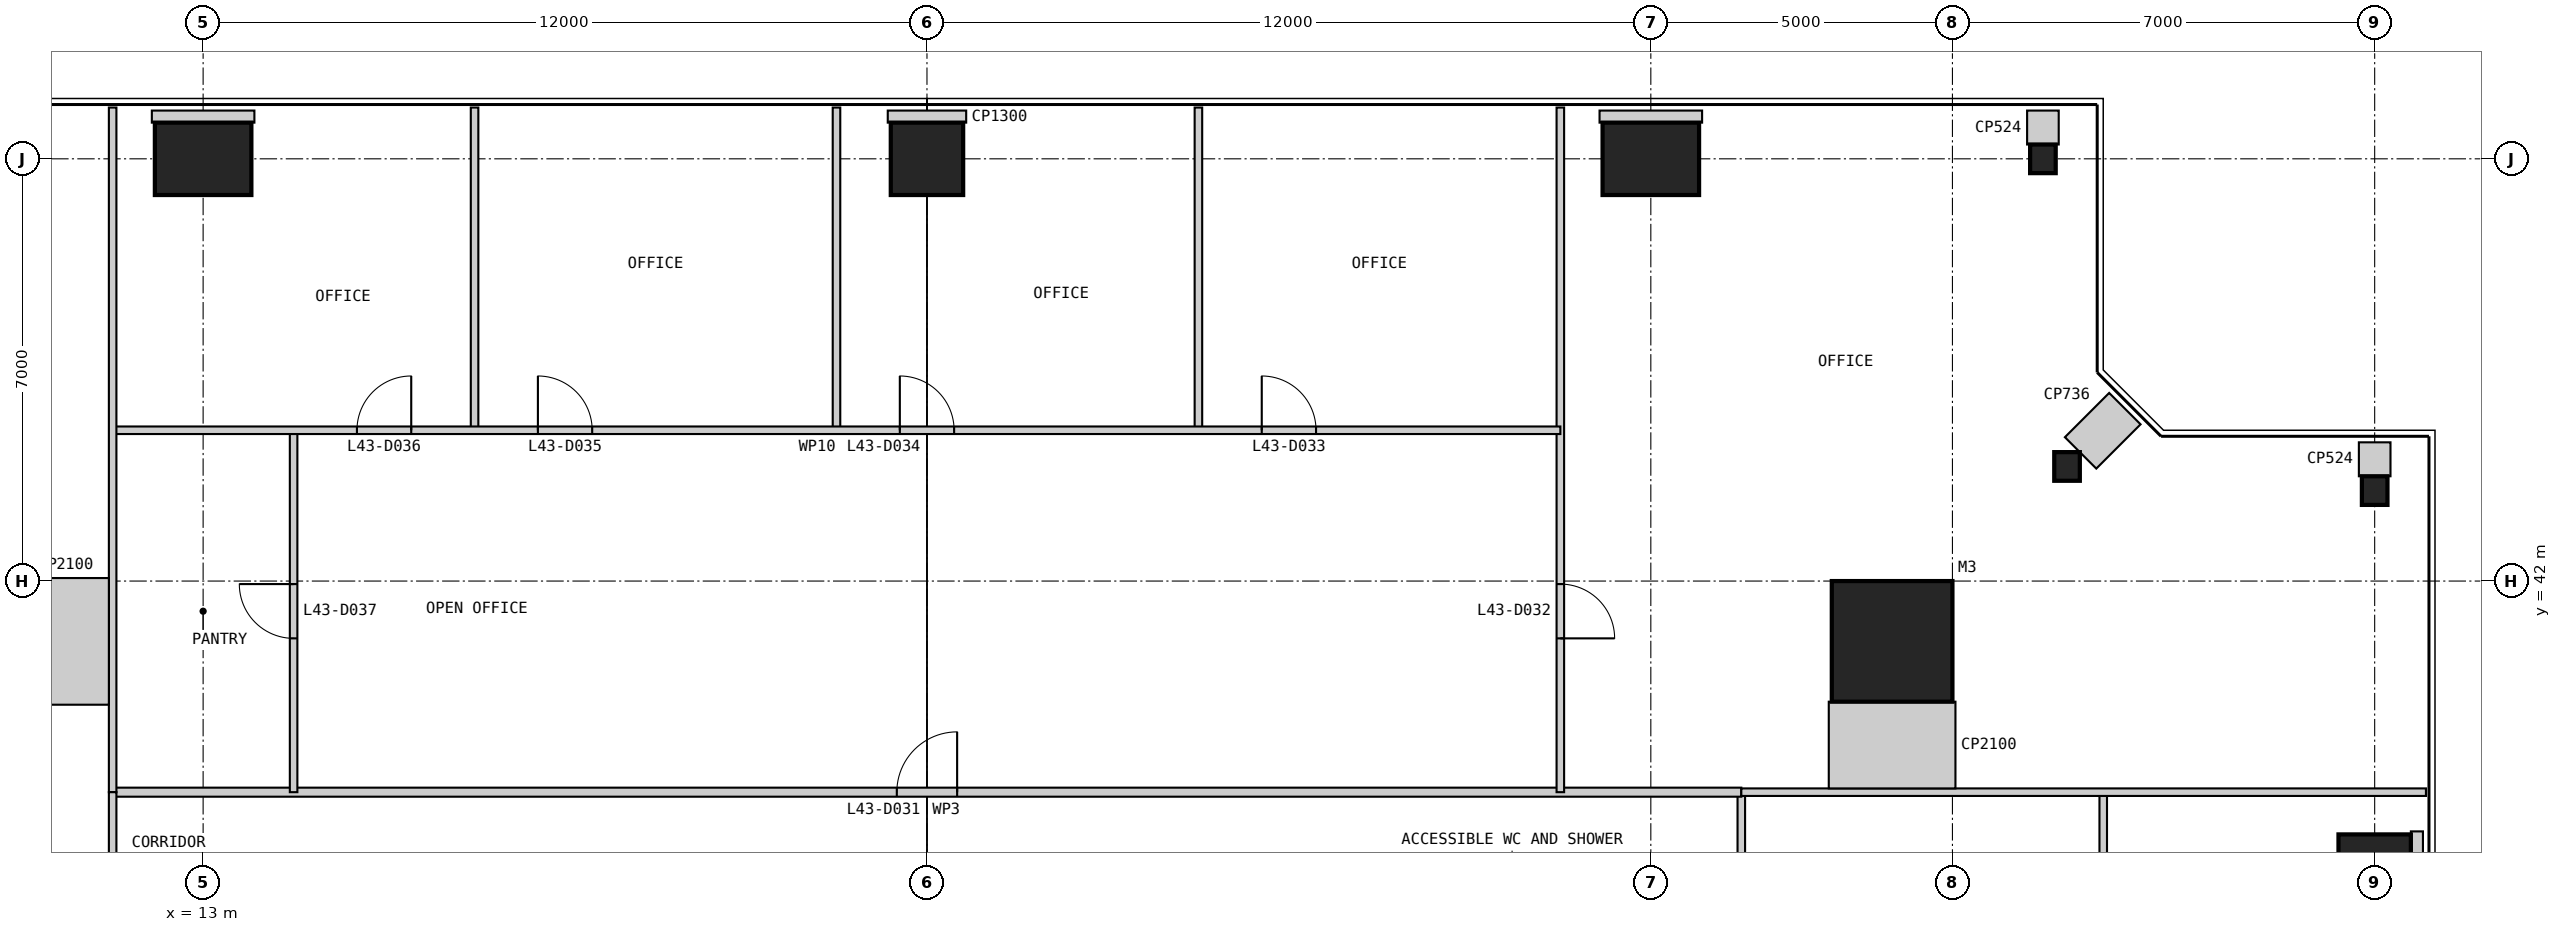
"""IFC4 building model, lengths in metres.
Left out: names, types, materials, properties, quantities, classifications, styles, units other than length and angle.
Written with IfcOpenShell. Run it as: python <this file> out.ifc"""

import sys

from ifc_helpers import new_model, si_unit, direction, frame, frame_2d, origin, origin_2d, place, context, subcontext, project, spatial, rectangle, i_section, extrude, element, fill, save


model = new_model("IFC4")
c1 = context("Model", 3, precision=1e-05, world=origin(), true_north=direction((0.0, 1.0)))
c2 = subcontext(c1, "Body", "Model", "MODEL_VIEW")
j1 = project(units=[si_unit("LENGTHUNIT", "METRE"), si_unit("PLANEANGLEUNIT", "RADIAN")], contexts=[c1])
p1 = place(None, origin())
s1 = spatial("IfcSite", under=j1, at=p1, CompositionType="ELEMENT")
p2 = place(p1, origin())
s2 = spatial("IfcBuilding", under=s1, at=p2, CompositionType="ELEMENT")
p3 = place(p2, frame((0.0, 0.0, 185.8)))
s3 = spatial("IfcBuildingStorey", under=s2, at=p3, CompositionType="ELEMENT", Elevation=185.8)
p4 = place(p3, frame((41.0, 41.0, 0.0), z_axis=(0.0, 0.0, 1.0), x_axis=(1.0, 0.0, 0.0)))
e1 = element("IfcColumn", 1, at=p4, inside=s3, PredefinedType="COLUMN", context=c2, shape_type="SweptSolid", body=[
    extrude(rectangle(XDim=2.0, YDim=2.0, at=origin_2d()), origin(), (0.0, 0.0, 1.0), 4.0),
])
p5 = place(p3, frame((49.0, 37.0, 0.0), z_axis=(0.0, 0.0, 1.0), x_axis=(1.0, 0.0, 0.0)))
e2 = element("IfcColumn", 2, at=p5, inside=s3, PredefinedType="COLUMN", context=c2, shape_type="SweptSolid", body=[
    extrude(rectangle(XDim=1.2, YDim=1.6, at=origin_2d()), origin(), (0.0, 0.0, 1.0), 4.0),
])
for number, where, z_axis, x_axis in (
    (3, (49.0, 43.5, 0.0), (0.0, 0.0, 1.0), (1.0, 0.0, 0.0)),
    (4, (43.9, 43.9, 0.0), (0.0, 0.0, 1.0), (1.0, 0.0, 0.0)),
    (5, (43.5, 49.0, 0.0), (0.0, 0.0, 1.0), (1.0, 0.0, 0.0)),
):
    element("IfcColumn", number, at=place(p3, frame(where, z_axis=z_axis, x_axis=x_axis)), inside=s3, PredefinedType="COLUMN", context=c2, shape_type="SweptSolid", body=[
        extrude(i_section(OverallWidth=0.424, OverallDepth=0.475, WebThickness=0.048, FlangeThickness=0.077, at=origin_2d()), origin(), (0.0, 0.0, 1.0), 4.0),
    ])
p6 = place(p3, frame((37.0, 49.0, 0.0), z_axis=(0.0, 0.0, 1.0), x_axis=(1.0, 0.0, 0.0)))
e6 = element("IfcColumn", 6, at=p6, inside=s3, PredefinedType="COLUMN", context=c2, shape_type="SweptSolid", body=[
    extrude(rectangle(XDim=1.6, YDim=1.2, at=origin_2d()), origin(), (0.0, 0.0, 1.0), 4.0),
])
p7 = place(p3, frame((25.0, 49.0, 0.0), z_axis=(0.0, 0.0, 1.0), x_axis=(1.0, 0.0, 0.0)))
e7 = element("IfcColumn", 7, at=p7, inside=s3, PredefinedType="COLUMN", context=c2, shape_type="SweptSolid", body=[
    extrude(rectangle(XDim=1.2, YDim=1.2, at=origin_2d()), origin(), (0.0, 0.0, 1.0), 4.0),
])
p8 = place(p3, frame((13.0, 49.0, 0.0), z_axis=(0.0, 0.0, 1.0), x_axis=(1.0, 0.0, 0.0)))
e8 = element("IfcColumn", 8, at=p8, inside=s3, PredefinedType="COLUMN", context=c2, shape_type="SweptSolid", body=[
    extrude(rectangle(XDim=1.6, YDim=1.2, at=origin_2d()), origin(), (0.0, 0.0, 1.0), 4.0),
])
p9 = place(p3, frame((44.5, 32.5, 0.0), z_axis=(0.0, 0.0, 1.0), x_axis=(0.0, 1.0, 0.0)))
e9 = element("IfcWall", 9, at=p9, inside=s3, PredefinedType="PARTITIONING", context=c2, shape_type="SweptSolid", body=[
    extrude(rectangle(XDim=6.0, YDim=0.125, at=frame_2d((3.0, 0.0))), origin(), (0.0, 0.0, 1.0), 3.85),
])
p10 = place(p3, frame((38.5, 35.5, 0.0), z_axis=(0.0, 0.0, 1.0), x_axis=(0.0, 1.0, 0.0)))
e10 = element("IfcWall", 10, at=p10, inside=s3, PredefinedType="PARTITIONING", context=c2, shape_type="SweptSolid", body=[
    extrude(rectangle(XDim=3.0, YDim=0.125, at=frame_2d((1.5, 0.0))), origin(), (0.0, 0.0, 1.0), 3.85),
])
p11 = place(p3, frame((38.5, 38.5, 0.0), z_axis=(0.0, 0.0, 1.0), x_axis=(-1.0, 0.0, 0.0)))
e11 = element("IfcWall", 11, at=p11, inside=s3, PredefinedType="PARTITIONING", context=c2, shape_type="SweptSolid", body=[
    extrude(rectangle(XDim=27.0, YDim=0.15, at=frame_2d((13.5, 0.0))), origin(), (0.0, 0.0, 1.0), 3.85),
])
p12 = place(p11, frame((13.0, 0.0, 0.0)))
e12 = element("IfcOpeningElement", 12, at=p12, cuts=e11, PredefinedType="OPENING", context=c2, shape_type="SweptSolid", body=[
    extrude(rectangle(XDim=1.0, YDim=2.2, at=frame_2d((0.5, 1.1))), frame((0.0, 0.085, 0.0), z_axis=(0.0, -1.0, 0.0), x_axis=(1.0, 0.0, 0.0)), (0.0, 0.0, 1.0), 0.17),
])
p13 = place(p3, frame((49.85, 38.5, 0.0), z_axis=(0.0, 0.0, 1.0), x_axis=(-1.0, 0.0, 0.0)))
e13 = element("IfcWall", 13, at=p13, inside=s3, PredefinedType="PARTITIONING", context=c2, shape_type="SweptSolid", body=[
    extrude(rectangle(XDim=11.35, YDim=0.125, at=frame_2d((5.675, 0.0))), origin(), (0.0, 0.0, 1.0), 3.85),
])
p14 = place(p3, frame((35.5, 49.85, 0.0), z_axis=(0.0, 0.0, 1.0), x_axis=(0.0, -1.0, 0.0)))
e14 = element("IfcWall", 14, at=p14, inside=s3, PredefinedType="PARTITIONING", context=c2, shape_type="SweptSolid", body=[
    extrude(rectangle(XDim=11.35, YDim=0.125, at=frame_2d((5.675, 0.0))), origin(), (0.0, 0.0, 1.0), 3.85),
])
p15 = place(p14, frame((7.9, 0.0, 0.0)))
e15 = element("IfcOpeningElement", 15, at=p15, cuts=e14, PredefinedType="OPENING", context=c2, shape_type="SweptSolid", body=[
    extrude(rectangle(XDim=0.9, YDim=2.2, at=frame_2d((0.45, 1.1))), frame((0.0, 0.073, 0.0), z_axis=(0.0, -1.0, 0.0), x_axis=(1.0, 0.0, 0.0)), (0.0, 0.0, 1.0), 0.145),
])
for number, where, z_axis, x_axis in (
    (16, (29.5, 49.85, 0.0), (0.0, 0.0, 1.0), (0.0, -1.0, 0.0)),
    (17, (23.5, 49.85, 0.0), (0.0, 0.0, 1.0), (0.0, -1.0, 0.0)),
    (18, (17.5, 49.85, 0.0), (0.0, 0.0, 1.0), (0.0, -1.0, 0.0)),
):
    element("IfcWall", number, at=place(p3, frame(where, z_axis=z_axis, x_axis=x_axis)), inside=s3, PredefinedType="PARTITIONING", context=c2, shape_type="SweptSolid", body=[
        extrude(rectangle(XDim=5.35, YDim=0.125, at=frame_2d((2.675, 0.0))), origin(), (0.0, 0.0, 1.0), 3.85),
    ])
p16 = place(p3, frame((14.5, 44.5, 0.0), z_axis=(0.0, 0.0, 1.0), x_axis=(0.0, -1.0, 0.0)))
e19 = element("IfcWall", 19, at=p16, inside=s3, PredefinedType="PARTITIONING", context=c2, shape_type="SweptSolid", body=[
    extrude(rectangle(XDim=6.0, YDim=0.125, at=frame_2d((3.0, 0.0))), origin(), (0.0, 0.0, 1.0), 3.85),
])
p17 = place(p16, frame((2.55, 0.0, 0.0)))
e20 = element("IfcOpeningElement", 20, at=p17, cuts=e19, PredefinedType="OPENING", context=c2, shape_type="SweptSolid", body=[
    extrude(rectangle(XDim=0.9, YDim=2.2, at=frame_2d((0.45, 1.1))), frame((0.0, 0.073, 0.0), z_axis=(0.0, -1.0, 0.0), x_axis=(1.0, 0.0, 0.0)), (0.0, 0.0, 1.0), 0.145),
])
p18 = place(p3, frame((35.5, 44.5, 0.0), z_axis=(0.0, 0.0, 1.0), x_axis=(-1.0, 0.0, 0.0)))
e21 = element("IfcWall", 21, at=p18, inside=s3, PredefinedType="PARTITIONING", context=c2, shape_type="SweptSolid", body=[
    extrude(rectangle(XDim=24.0, YDim=0.125, at=frame_2d((12.0, 0.0))), origin(), (0.0, 0.0, 1.0), 3.85),
])
p19 = place(p18, frame((4.05, 0.0, 0.0)))
e22 = element("IfcOpeningElement", 22, at=p19, cuts=e21, PredefinedType="OPENING", context=c2, shape_type="SweptSolid", body=[
    extrude(rectangle(XDim=0.9, YDim=2.2, at=frame_2d((0.45, 1.1))), frame((0.0, 0.073, 0.0), z_axis=(0.0, -1.0, 0.0), x_axis=(1.0, 0.0, 0.0)), (0.0, 0.0, 1.0), 0.145),
])
p20 = place(p18, frame((10.05, 0.0, 0.0)))
e23 = element("IfcOpeningElement", 23, at=p20, cuts=e21, PredefinedType="OPENING", context=c2, shape_type="SweptSolid", body=[
    extrude(rectangle(XDim=0.9, YDim=2.2, at=frame_2d((0.45, 1.1))), frame((0.0, 0.073, 0.0), z_axis=(0.0, -1.0, 0.0), x_axis=(1.0, 0.0, 0.0)), (0.0, 0.0, 1.0), 0.145),
])
p21 = place(p18, frame((16.05, 0.0, 0.0)))
e24 = element("IfcOpeningElement", 24, at=p21, cuts=e21, PredefinedType="OPENING", context=c2, shape_type="SweptSolid", body=[
    extrude(rectangle(XDim=0.9, YDim=2.2, at=frame_2d((0.45, 1.1))), frame((0.0, 0.073, 0.0), z_axis=(0.0, -1.0, 0.0), x_axis=(1.0, 0.0, 0.0)), (0.0, 0.0, 1.0), 0.145),
])
p22 = place(p18, frame((19.05, 0.0, 0.0)))
e25 = element("IfcOpeningElement", 25, at=p22, cuts=e21, PredefinedType="OPENING", context=c2, shape_type="SweptSolid", body=[
    extrude(rectangle(XDim=0.9, YDim=2.2, at=frame_2d((0.45, 1.1))), frame((0.0, 0.073, 0.0), z_axis=(0.0, -1.0, 0.0), x_axis=(1.0, 0.0, 0.0)), (0.0, 0.0, 1.0), 0.145),
])
p23 = place(p3, frame((11.5, 49.85, 0.0), z_axis=(0.0, 0.0, 1.0), x_axis=(0.0, -1.0, 0.0)))
e26 = element("IfcWall", 26, at=p23, inside=s3, PredefinedType="PARTITIONING", context=c2, shape_type="SweptSolid", body=[
    extrude(rectangle(XDim=11.35, YDim=0.125, at=frame_2d((5.675, 0.0))), origin(), (0.0, 0.0, 1.0), 3.85),
])
p24 = place(p3, frame((11.5, 38.5, 0.0), z_axis=(0.0, 0.0, 1.0), x_axis=(0.0, -1.0, 0.0)))
e27 = element("IfcWall", 27, at=p24, inside=s3, PredefinedType="PARTITIONING", context=c2, shape_type="SweptSolid", body=[
    extrude(rectangle(XDim=3.0, YDim=0.125, at=frame_2d((1.5, 0.0))), origin(), (0.0, 0.0, 1.0), 3.85),
])
p25 = place(p3, frame((49.8, 37.0, 0.0), z_axis=(0.0, 0.0, 1.0), x_axis=(-1.0, 0.0, 0.0)))
e28 = element("IfcWall", 28, at=p25, inside=s3, PredefinedType="PARTITIONING", context=c2, shape_type="SweptSolid", body=[
    extrude(rectangle(XDim=0.2, YDim=1.7, at=frame_2d((0.1, 0.0))), origin(), (0.0, 0.0, 1.0), 3.85),
])
p26 = place(p3, frame((41.0, 38.562, 0.0), z_axis=(0.0, 0.0, 1.0), x_axis=(0.0, 1.0, 0.0)))
e29 = element("IfcWall", 29, at=p26, inside=s3, PredefinedType="PARTITIONING", context=c2, shape_type="SweptSolid", body=[
    extrude(rectangle(XDim=1.438, YDim=2.1, at=frame_2d((0.719, 0.0))), origin(), (0.0, 0.0, 1.0), 3.85),
])
p27 = place(p3, frame((49.0, 44.3, 0.0), z_axis=(0.0, 0.0, 1.0), x_axis=(0.0, -1.0, 0.0)))
e30 = element("IfcWall", 30, at=p27, inside=s3, PredefinedType="PARTITIONING", context=c2, shape_type="SweptSolid", body=[
    extrude(rectangle(XDim=0.562, YDim=0.524, at=frame_2d((0.281, 0.0))), origin(), (0.0, 0.0, 1.0), 3.85),
])
p28 = place(p3, frame((44.859, 44.859, 0.0), z_axis=(0.0, 0.0, 1.0), x_axis=(-0.707106781187, -0.707106781187, 0.0)))
e31 = element("IfcWall", 31, at=p28, inside=s3, PredefinedType="PARTITIONING", context=c2, shape_type="SweptSolid", body=[
    extrude(rectangle(XDim=1.038, YDim=0.736, at=frame_2d((0.519, 0.0))), origin(), (0.0, 0.0, 1.0), 3.85),
])
p29 = place(p3, frame((43.5, 49.8, 0.0), z_axis=(0.0, 0.0, 1.0), x_axis=(0.0, -1.0, 0.0)))
e32 = element("IfcWall", 32, at=p29, inside=s3, PredefinedType="PARTITIONING", context=c2, shape_type="SweptSolid", body=[
    extrude(rectangle(XDim=0.562, YDim=0.524, at=frame_2d((0.281, 0.0))), origin(), (0.0, 0.0, 1.0), 3.85),
])
p30 = place(p3, frame((37.0, 49.8, 0.0), z_axis=(0.0, 0.0, 1.0), x_axis=(0.0, -1.0, 0.0)))
e33 = element("IfcWall", 33, at=p30, inside=s3, PredefinedType="PARTITIONING", context=c2, shape_type="SweptSolid", body=[
    extrude(rectangle(XDim=0.2, YDim=1.7, at=frame_2d((0.1, 0.0))), origin(), (0.0, 0.0, 1.0), 3.85),
])
p31 = place(p3, frame((25.0, 49.8, 0.0), z_axis=(0.0, 0.0, 1.0), x_axis=(0.0, -1.0, 0.0)))
e34 = element("IfcWall", 34, at=p31, inside=s3, PredefinedType="PARTITIONING", context=c2, shape_type="SweptSolid", body=[
    extrude(rectangle(XDim=0.2, YDim=1.3, at=frame_2d((0.1, 0.0))), origin(), (0.0, 0.0, 1.0), 3.85),
])
p32 = place(p3, frame((13.0, 49.8, 0.0), z_axis=(0.0, 0.0, 1.0), x_axis=(0.0, -1.0, 0.0)))
e35 = element("IfcWall", 35, at=p32, inside=s3, PredefinedType="PARTITIONING", context=c2, shape_type="SweptSolid", body=[
    extrude(rectangle(XDim=0.2, YDim=1.7, at=frame_2d((0.1, 0.0))), origin(), (0.0, 0.0, 1.0), 3.85),
])
p33 = place(p3, frame((11.438, 41.0, 0.0), z_axis=(0.0, 0.0, 1.0), x_axis=(-1.0, 0.0, 0.0)))
e36 = element("IfcWall", 36, at=p33, inside=s3, PredefinedType="PARTITIONING", context=c2, shape_type="SweptSolid", body=[
    extrude(rectangle(XDim=1.438, YDim=2.1, at=frame_2d((0.719, 0.0))), origin(), (0.0, 0.0, 1.0), 3.85),
])
p34 = place(p12, frame((1.0, 0.0, 0.0), z_axis=(0.0, 0.0, 1.0), x_axis=(-1.0, 0.0, 0.0)))
e37 = element("IfcDoor", 37, at=p34, inside=s3, OperationType="SINGLE_SWING_RIGHT", PredefinedType="DOOR", context=c2, shape_type="SweptSolid", body=[
    extrude(rectangle(XDim=1.0, YDim=2.2, at=frame_2d((0.5, 1.1))), frame((0.0, 0.025, 0.0), z_axis=(0.0, -1.0, 0.0), x_axis=(1.0, 0.0, 0.0)), (0.0, 0.0, 1.0), 0.05),
])
fill(e12, e37)
p35 = place(p15, origin())
e38 = element("IfcDoor", 38, at=p35, inside=s3, OperationType="SINGLE_SWING_RIGHT", PredefinedType="DOOR", context=c2, shape_type="SweptSolid", body=[
    extrude(rectangle(XDim=0.9, YDim=2.2, at=frame_2d((0.45, 1.1))), frame((0.0, 0.025, 0.0), z_axis=(0.0, -1.0, 0.0), x_axis=(1.0, 0.0, 0.0)), (0.0, 0.0, 1.0), 0.05),
])
fill(e15, e38)
p36 = place(p19, frame((0.9, 0.0, 0.0), z_axis=(0.0, 0.0, 1.0), x_axis=(-1.0, 0.0, 0.0)))
e39 = element("IfcDoor", 39, at=p36, inside=s3, OperationType="SINGLE_SWING_LEFT", PredefinedType="DOOR", context=c2, shape_type="SweptSolid", body=[
    extrude(rectangle(XDim=0.9, YDim=2.2, at=frame_2d((0.45, 1.1))), frame((0.0, 0.025, 0.0), z_axis=(0.0, -1.0, 0.0), x_axis=(1.0, 0.0, 0.0)), (0.0, 0.0, 1.0), 0.05),
])
fill(e22, e39)
p37 = place(p20, frame((0.9, 0.0, 0.0), z_axis=(0.0, 0.0, 1.0), x_axis=(-1.0, 0.0, 0.0)))
e40 = element("IfcDoor", 40, at=p37, inside=s3, OperationType="SINGLE_SWING_LEFT", PredefinedType="DOOR", context=c2, shape_type="SweptSolid", body=[
    extrude(rectangle(XDim=0.9, YDim=2.2, at=frame_2d((0.45, 1.1))), frame((0.0, 0.025, 0.0), z_axis=(0.0, -1.0, 0.0), x_axis=(1.0, 0.0, 0.0)), (0.0, 0.0, 1.0), 0.05),
])
fill(e23, e40)
p38 = place(p21, frame((0.9, 0.0, 0.0), z_axis=(0.0, 0.0, 1.0), x_axis=(-1.0, 0.0, 0.0)))
e41 = element("IfcDoor", 41, at=p38, inside=s3, OperationType="SINGLE_SWING_LEFT", PredefinedType="DOOR", context=c2, shape_type="SweptSolid", body=[
    extrude(rectangle(XDim=0.9, YDim=2.2, at=frame_2d((0.45, 1.1))), frame((0.0, 0.025, 0.0), z_axis=(0.0, -1.0, 0.0), x_axis=(1.0, 0.0, 0.0)), (0.0, 0.0, 1.0), 0.05),
])
fill(e24, e41)
p39 = place(p22, frame((0.9, 0.0, 0.0), z_axis=(0.0, 0.0, 1.0), x_axis=(-1.0, 0.0, 0.0)))
e42 = element("IfcDoor", 42, at=p39, inside=s3, OperationType="SINGLE_SWING_RIGHT", PredefinedType="DOOR", context=c2, shape_type="SweptSolid", body=[
    extrude(rectangle(XDim=0.9, YDim=2.2, at=frame_2d((0.45, 1.1))), frame((0.0, 0.025, 0.0), z_axis=(0.0, -1.0, 0.0), x_axis=(1.0, 0.0, 0.0)), (0.0, 0.0, 1.0), 0.05),
])
fill(e25, e42)
p40 = place(p17, frame((0.9, 0.0, 0.0), z_axis=(0.0, 0.0, 1.0), x_axis=(-1.0, 0.0, 0.0)))
e43 = element("IfcDoor", 43, at=p40, inside=s3, OperationType="SINGLE_SWING_RIGHT", PredefinedType="DOOR", context=c2, shape_type="SweptSolid", body=[
    extrude(rectangle(XDim=0.9, YDim=2.2, at=frame_2d((0.45, 1.1))), frame((0.0, 0.025, 0.0), z_axis=(0.0, -1.0, 0.0), x_axis=(1.0, 0.0, 0.0)), (0.0, 0.0, 1.0), 0.05),
])
fill(e20, e43)
save(model, sys.argv[1])
